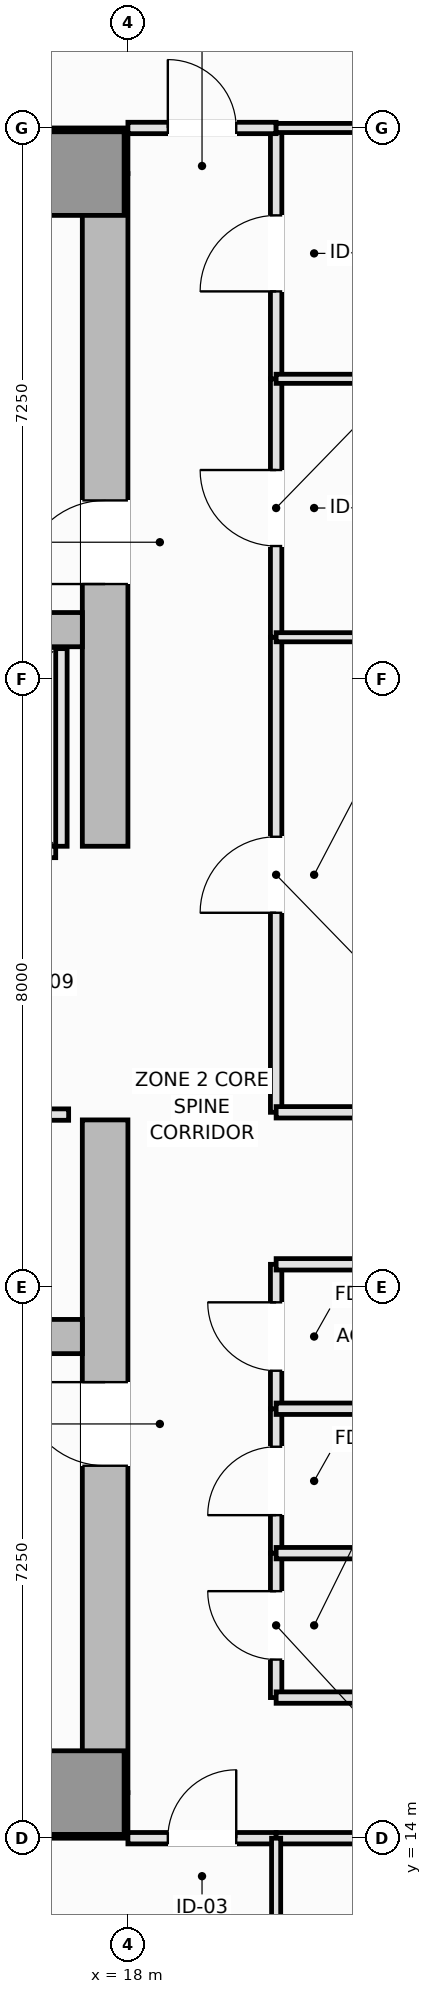
"""IFC4 building model, lengths in metres.
Left out: names, types, materials, properties, quantities, classifications, styles, units other than length and angle.
Written with IfcOpenShell. Run it as: python <this file> out.ifc"""

import sys

from ifc_helpers import new_model, si_unit, direction, frame, frame_2d, origin, origin_2d, place, context, subcontext, project, spatial, rectangle, extrude, element, fill, save


model = new_model("IFC4")
c1 = context("Model", 3, precision=1e-05, world=origin(), true_north=direction((0.0, 1.0)))
c2 = subcontext(c1, "Body", "Model", "MODEL_VIEW")
j1 = project(units=[si_unit("LENGTHUNIT", "METRE"), si_unit("PLANEANGLEUNIT", "RADIAN")], contexts=[c1])
p1 = place(None, origin())
s1 = spatial("IfcSite", under=j1, at=p1, CompositionType="ELEMENT")
p2 = place(p1, origin())
s2 = spatial("IfcBuilding", under=s1, at=p2, CompositionType="ELEMENT")
p3 = place(p2, frame((0.0, 0.0, 127.1)))
s3 = spatial("IfcBuildingStorey", under=s2, at=p3, CompositionType="ELEMENT", Elevation=127.1)
for number, where, z_axis, x_axis in (
    (1, (4.5, 14.3, 0.0), (0.0, 0.0, 1.0), (1.0, 0.0, 0.0)),
    (2, (4.5, 36.2, 0.0), (0.0, 0.0, 1.0), (1.0, 0.0, 0.0)),
):
    element("IfcWall", number, at=place(p3, frame(where, z_axis=z_axis, x_axis=x_axis)), inside=s3, PredefinedType="SHEAR", context=c2, shape_type="SweptSolid", body=[
        extrude(rectangle(XDim=13.5, YDim=0.6, at=frame_2d((6.75, 0.0))), origin(), (0.0, 0.0, 1.0), 3.55),
    ])
p4 = place(p3, frame((17.7, 14.6, 0.0), z_axis=(0.0, 0.0, 1.0), x_axis=(0.0, 1.0, 0.0)))
e3 = element("IfcWall", 3, at=p4, inside=s3, PredefinedType="SHEAR", context=c2, shape_type="SweptSolid", body=[
    extrude(rectangle(XDim=8.85, YDim=0.6, at=frame_2d((4.425, 0.0))), origin(), (0.0, 0.0, 1.0), 3.55),
])
p5 = place(p4, frame((4.3, 0.0, 0.0)))
e4 = element("IfcOpeningElement", 4, at=p5, cuts=e3, PredefinedType="OPENING", context=c2, shape_type="SweptSolid", body=[
    extrude(rectangle(XDim=1.1, YDim=2.15, at=frame_2d((0.55, 1.075))), frame((0.0, 0.31, 0.0), z_axis=(0.0, -1.0, 0.0), x_axis=(1.0, 0.0, 0.0)), (0.0, 0.0, 1.0), 0.62),
])
p6 = place(p3, frame((17.7, 27.05, 0.0), z_axis=(0.0, 0.0, 1.0), x_axis=(0.0, 1.0, 0.0)))
e5 = element("IfcWall", 5, at=p6, inside=s3, PredefinedType="SHEAR", context=c2, shape_type="SweptSolid", body=[
    extrude(rectangle(XDim=8.85, YDim=0.6, at=frame_2d((4.425, 0.0))), origin(), (0.0, 0.0, 1.0), 3.55),
])
p7 = place(p6, frame((3.45, 0.0, 0.0)))
e6 = element("IfcOpeningElement", 6, at=p7, cuts=e5, PredefinedType="OPENING", context=c2, shape_type="SweptSolid", body=[
    extrude(rectangle(XDim=1.1, YDim=2.15, at=frame_2d((0.55, 1.075))), frame((0.0, 0.31, 0.0), z_axis=(0.0, -1.0, 0.0), x_axis=(1.0, 0.0, 0.0)), (0.0, 0.0, 1.0), 0.62),
])
for number, where, z_axis, x_axis in (
    (7, (5.1, 20.6, 0.0), (0.0, 0.0, 1.0), (1.0, 0.0, 0.0)),
    (8, (5.1, 29.9, 0.0), (0.0, 0.0, 1.0), (1.0, 0.0, 0.0)),
):
    element("IfcWall", number, at=place(p3, frame(where, z_axis=z_axis, x_axis=x_axis)), inside=s3, PredefinedType="SHEAR", context=c2, shape_type="SweptSolid", body=[
        extrude(rectangle(XDim=12.3, YDim=0.45, at=frame_2d((6.15, 0.0))), origin(), (0.0, 0.0, 1.0), 3.55),
    ])
for number, where, z_axis, x_axis in (
    (9, (17.4, 14.6, 0.0), (0.0, 0.0, 1.0), (1.0, 0.0, 0.0)),
    (10, (17.4, 35.9, 0.0), (0.0, 0.0, 1.0), (1.0, 0.0, 0.0)),
):
    element("IfcColumn", number, at=place(p3, frame(where, z_axis=z_axis, x_axis=x_axis)), inside=s3, PredefinedType="PILASTER", context=c2, shape_type="SweptSolid", body=[
        extrude(rectangle(XDim=1.1, YDim=1.1, at=origin_2d()), origin(), (0.0, 0.0, 1.0), 3.55),
    ])
p8 = place(p3, frame((14.5, 26.975, 0.0), z_axis=(0.0, 0.0, 1.0), x_axis=(1.0, 0.0, 0.0)))
e11 = element("IfcWall", 11, at=p8, inside=s3, PredefinedType="PARTITIONING", context=c2, shape_type="SweptSolid", body=[
    extrude(rectangle(XDim=2.55, YDim=0.15, at=frame_2d((1.275, 0.0))), origin(), (0.0, 0.0, 1.0), 3.37),
])
p9 = place(p8, frame((0.625, 0.0, 0.0)))
e12 = element("IfcOpeningElement", 12, at=p9, cuts=e11, PredefinedType="OPENING", context=c2, shape_type="SweptSolid", body=[
    extrude(rectangle(XDim=1.3, YDim=2.2, at=frame_2d((0.65, 1.1))), frame((0.0, 0.085, 0.0), z_axis=(0.0, -1.0, 0.0), x_axis=(1.0, 0.0, 0.0)), (0.0, 0.0, 1.0), 0.17),
])
p10 = place(p3, frame((17.125, 27.05, 0.0), z_axis=(0.0, 0.0, 1.0), x_axis=(0.0, 1.0, 0.0)))
e13 = element("IfcWall", 13, at=p10, inside=s3, PredefinedType="PARTITIONING", context=c2, shape_type="SweptSolid", body=[
    extrude(rectangle(XDim=2.6, YDim=0.15, at=frame_2d((1.3, 0.0))), origin(), (0.0, 0.0, 1.0), 3.37),
])
p11 = place(p3, frame((14.33, 23.52, 0.0), z_axis=(0.0, 0.0, 1.0), x_axis=(1.0, 0.0, 0.0)))
e14 = element("IfcWall", 14, at=p11, inside=s3, PredefinedType="PARTITIONING", context=c2, shape_type="SweptSolid", body=[
    extrude(rectangle(XDim=2.89, YDim=0.15, at=frame_2d((1.445, 0.0))), origin(), (0.0, 0.0, 1.0), 3.37),
])
p12 = place(p11, frame((1.053, 0.0, 0.0)))
e15 = element("IfcOpeningElement", 15, at=p12, cuts=e14, PredefinedType="OPENING", context=c2, shape_type="SweptSolid", body=[
    extrude(rectangle(XDim=0.9, YDim=2.1, at=frame_2d((0.45, 1.05))), frame((0.0, 0.085, 0.0), z_axis=(0.0, -1.0, 0.0), x_axis=(1.0, 0.0, 0.0)), (0.0, 0.0, 1.0), 0.17),
])
p13 = place(p3, frame((19.95, 15.85, 0.0), z_axis=(0.0, 0.0, 1.0), x_axis=(0.0, 1.0, 0.0)))
e16 = element("IfcWall", 16, at=p13, inside=s3, PredefinedType="PLUMBINGWALL", context=c2, shape_type="SweptSolid", body=[
    extrude(rectangle(XDim=1.9, YDim=0.15, at=frame_2d((0.95, 0.0))), origin(), (0.0, 0.0, 1.0), 3.37),
])
p14 = place(p13, frame((0.5, 0.0, 0.0)))
e17 = element("IfcOpeningElement", 17, at=p14, cuts=e16, PredefinedType="OPENING", context=c2, shape_type="SweptSolid", body=[
    extrude(rectangle(XDim=0.9, YDim=2.1, at=frame_2d((0.45, 1.05))), frame((0.0, 0.085, 0.0), z_axis=(0.0, -1.0, 0.0), x_axis=(1.0, 0.0, 0.0)), (0.0, 0.0, 1.0), 0.17),
])
p15 = place(p3, frame((19.95, 17.75, 0.0), z_axis=(0.0, 0.0, 1.0), x_axis=(0.0, 1.0, 0.0)))
e18 = element("IfcWall", 18, at=p15, inside=s3, PredefinedType="PLUMBINGWALL", context=c2, shape_type="SweptSolid", body=[
    extrude(rectangle(XDim=1.9, YDim=0.15, at=frame_2d((0.95, 0.0))), origin(), (0.0, 0.0, 1.0), 3.37),
])
p16 = place(p15, frame((0.5, 0.0, 0.0)))
e19 = element("IfcOpeningElement", 19, at=p16, cuts=e18, PredefinedType="OPENING", context=c2, shape_type="SweptSolid", body=[
    extrude(rectangle(XDim=0.9, YDim=2.1, at=frame_2d((0.45, 1.05))), frame((0.0, 0.085, 0.0), z_axis=(0.0, -1.0, 0.0), x_axis=(1.0, 0.0, 0.0)), (0.0, 0.0, 1.0), 0.17),
])
p17 = place(p3, frame((19.95, 19.65, 0.0), z_axis=(0.0, 0.0, 1.0), x_axis=(0.0, 1.0, 0.0)))
e20 = element("IfcWall", 20, at=p17, inside=s3, PredefinedType="PLUMBINGWALL", context=c2, shape_type="SweptSolid", body=[
    extrude(rectangle(XDim=1.9, YDim=0.15, at=frame_2d((0.95, 0.0))), origin(), (0.0, 0.0, 1.0), 3.37),
])
p18 = place(p17, frame((0.5, 0.0, 0.0)))
e21 = element("IfcOpeningElement", 21, at=p18, cuts=e20, PredefinedType="OPENING", context=c2, shape_type="SweptSolid", body=[
    extrude(rectangle(XDim=0.9, YDim=2.1, at=frame_2d((0.45, 1.05))), frame((0.0, 0.085, 0.0), z_axis=(0.0, -1.0, 0.0), x_axis=(1.0, 0.0, 0.0)), (0.0, 0.0, 1.0), 0.17),
])
p19 = place(p3, frame((19.95, 23.55, 0.0), z_axis=(0.0, 0.0, 1.0), x_axis=(0.0, 1.0, 0.0)))
e22 = element("IfcWall", 22, at=p19, inside=s3, PredefinedType="PARTITIONING", context=c2, shape_type="SweptSolid", body=[
    extrude(rectangle(XDim=6.25, YDim=0.15, at=frame_2d((3.125, 0.0))), origin(), (0.0, 0.0, 1.0), 3.37),
])
p20 = place(p19, frame((2.625, 0.0, 0.0)))
e23 = element("IfcOpeningElement", 23, at=p20, cuts=e22, PredefinedType="OPENING", context=c2, shape_type="SweptSolid", body=[
    extrude(rectangle(XDim=1.0, YDim=2.15, at=frame_2d((0.5, 1.075))), frame((0.0, 0.085, 0.0), z_axis=(0.0, -1.0, 0.0), x_axis=(1.0, 0.0, 0.0)), (0.0, 0.0, 1.0), 0.17),
])
p21 = place(p3, frame((19.95, 29.8, 0.0), z_axis=(0.0, 0.0, 1.0), x_axis=(0.0, 1.0, 0.0)))
e24 = element("IfcWall", 24, at=p21, inside=s3, PredefinedType="PARTITIONING", context=c2, shape_type="SweptSolid", body=[
    extrude(rectangle(XDim=3.4, YDim=0.15, at=frame_2d((1.7, 0.0))), origin(), (0.0, 0.0, 1.0), 3.37),
])
p22 = place(p21, frame((1.2, 0.0, 0.0)))
e25 = element("IfcOpeningElement", 25, at=p22, cuts=e24, PredefinedType="OPENING", context=c2, shape_type="SweptSolid", body=[
    extrude(rectangle(XDim=1.0, YDim=2.15, at=frame_2d((0.5, 1.075))), frame((0.0, 0.085, 0.0), z_axis=(0.0, -1.0, 0.0), x_axis=(1.0, 0.0, 0.0)), (0.0, 0.0, 1.0), 0.17),
])
p23 = place(p3, frame((19.95, 33.2, 0.0), z_axis=(0.0, 0.0, 1.0), x_axis=(0.0, 1.0, 0.0)))
e26 = element("IfcWall", 26, at=p23, inside=s3, PredefinedType="PARTITIONING", context=c2, shape_type="SweptSolid", body=[
    extrude(rectangle(XDim=3.3, YDim=0.15, at=frame_2d((1.65, 0.0))), origin(), (0.0, 0.0, 1.0), 3.37),
])
p24 = place(p23, frame((1.15, 0.0, 0.0)))
e27 = element("IfcOpeningElement", 27, at=p24, cuts=e26, PredefinedType="OPENING", context=c2, shape_type="SweptSolid", body=[
    extrude(rectangle(XDim=1.0, YDim=2.15, at=frame_2d((0.5, 1.075))), frame((0.0, 0.085, 0.0), z_axis=(0.0, -1.0, 0.0), x_axis=(1.0, 0.0, 0.0)), (0.0, 0.0, 1.0), 0.17),
])
p25 = place(p3, frame((18.0, 14.0, 0.0), z_axis=(0.0, 0.0, 1.0), x_axis=(1.0, 0.0, 0.0)))
e28 = element("IfcWall", 28, at=p25, inside=s3, PredefinedType="PARTITIONING", context=c2, shape_type="SweptSolid", body=[
    extrude(rectangle(XDim=1.95, YDim=0.15, at=frame_2d((0.975, 0.0))), origin(), (0.0, 0.0, 1.0), 3.37),
])
p26 = place(p25, frame((0.525, 0.0, 0.0)))
e29 = element("IfcOpeningElement", 29, at=p26, cuts=e28, PredefinedType="OPENING", context=c2, shape_type="SweptSolid", body=[
    extrude(rectangle(XDim=0.9, YDim=2.1, at=frame_2d((0.45, 1.05))), frame((0.0, 0.085, 0.0), z_axis=(0.0, -1.0, 0.0), x_axis=(1.0, 0.0, 0.0)), (0.0, 0.0, 1.0), 0.17),
])
p27 = place(p3, frame((18.0, 36.5, 0.0), z_axis=(0.0, 0.0, 1.0), x_axis=(1.0, 0.0, 0.0)))
e30 = element("IfcWall", 30, at=p27, inside=s3, PredefinedType="PARTITIONING", context=c2, shape_type="SweptSolid", body=[
    extrude(rectangle(XDim=1.95, YDim=0.15, at=frame_2d((0.975, 0.0))), origin(), (0.0, 0.0, 1.0), 3.37),
])
p28 = place(p27, frame((0.525, 0.0, 0.0)))
e31 = element("IfcOpeningElement", 31, at=p28, cuts=e30, PredefinedType="OPENING", context=c2, shape_type="SweptSolid", body=[
    extrude(rectangle(XDim=0.9, YDim=2.1, at=frame_2d((0.45, 1.05))), frame((0.0, 0.085, 0.0), z_axis=(0.0, -1.0, 0.0), x_axis=(1.0, 0.0, 0.0)), (0.0, 0.0, 1.0), 0.17),
])
p29 = place(p3, frame((19.95, 21.55, 0.0), z_axis=(0.0, 0.0, 1.0), x_axis=(1.0, 0.0, 0.0)))
e32 = element("IfcWall", 32, at=p29, inside=s3, PredefinedType="PLUMBINGWALL", context=c2, shape_type="SweptSolid", body=[
    extrude(rectangle(XDim=3.65, YDim=0.15, at=frame_2d((1.825, 0.0))), origin(), (0.0, 0.0, 1.0), 3.37),
])
p30 = place(p3, frame((19.95, 23.55, 0.0), z_axis=(0.0, 0.0, 1.0), x_axis=(1.0, 0.0, 0.0)))
e33 = element("IfcWall", 33, at=p30, inside=s3, PredefinedType="PARTITIONING", context=c2, shape_type="SweptSolid", body=[
    extrude(rectangle(XDim=7.55, YDim=0.15, at=frame_2d((3.775, 0.0))), origin(), (0.0, 0.0, 1.0), 3.37),
])
p31 = place(p3, frame((19.95, 15.85, 0.0), z_axis=(0.0, 0.0, 1.0), x_axis=(1.0, 0.0, 0.0)))
e34 = element("IfcWall", 34, at=p31, inside=s3, PredefinedType="PLUMBINGWALL", context=c2, shape_type="SweptSolid", body=[
    extrude(rectangle(XDim=3.65, YDim=0.15, at=frame_2d((1.825, 0.0))), origin(), (0.0, 0.0, 1.0), 3.37),
])
p32 = place(p3, frame((19.95, 14.0, 0.0), z_axis=(0.0, 0.0, 1.0), x_axis=(1.0, 0.0, 0.0)))
e35 = element("IfcWall", 35, at=p32, inside=s3, PredefinedType="PARTITIONING", context=c2, shape_type="SweptSolid", body=[
    extrude(rectangle(XDim=7.55, YDim=0.15, at=frame_2d((3.775, 0.0))), origin(), (0.0, 0.0, 1.0), 3.37),
])
p33 = place(p32, frame((3.275, 0.0, 0.0)))
e36 = element("IfcOpeningElement", 36, at=p33, cuts=e35, PredefinedType="OPENING", context=c2, shape_type="SweptSolid", body=[
    extrude(rectangle(XDim=1.0, YDim=2.15, at=frame_2d((0.5, 1.075))), frame((0.0, 0.085, 0.0), z_axis=(0.0, -1.0, 0.0), x_axis=(1.0, 0.0, 0.0)), (0.0, 0.0, 1.0), 0.17),
])
for number, where, z_axis, x_axis in (
    (37, (19.95, 17.75, 0.0), (0.0, 0.0, 1.0), (1.0, 0.0, 0.0)),
    (38, (19.95, 19.65, 0.0), (0.0, 0.0, 1.0), (1.0, 0.0, 0.0)),
):
    element("IfcWall", number, at=place(p3, frame(where, z_axis=z_axis, x_axis=x_axis)), inside=s3, PredefinedType="PLUMBINGWALL", context=c2, shape_type="SweptSolid", body=[
        extrude(rectangle(XDim=3.65, YDim=0.15, at=frame_2d((1.825, 0.0))), origin(), (0.0, 0.0, 1.0), 3.37),
    ])
for number, where, z_axis, x_axis in (
    (39, (19.95, 29.8, 0.0), (0.0, 0.0, 1.0), (1.0, 0.0, 0.0)),
    (40, (19.95, 33.2, 0.0), (0.0, 0.0, 1.0), (1.0, 0.0, 0.0)),
    (41, (19.95, 36.5, 0.0), (0.0, 0.0, 1.0), (1.0, 0.0, 0.0)),
):
    element("IfcWall", number, at=place(p3, frame(where, z_axis=z_axis, x_axis=x_axis)), inside=s3, PredefinedType="PARTITIONING", context=c2, shape_type="SweptSolid", body=[
        extrude(rectangle(XDim=7.55, YDim=0.12, at=frame_2d((3.775, 0.0))), origin(), (0.0, 0.0, 1.0), 3.37),
    ])
p34 = place(p3, frame((19.95, 3.51, 0.0), z_axis=(0.0, 0.0, 1.0), x_axis=(0.0, 1.0, 0.0)))
e42 = element("IfcWall", 42, at=p34, inside=s3, PredefinedType="PARTITIONING", context=c2, shape_type="SweptSolid", body=[
    extrude(rectangle(XDim=10.49, YDim=0.12, at=frame_2d((5.245, 0.0))), origin(), (0.0, 0.0, 1.0), 3.37),
])
p35 = place(p5, origin())
e43 = element("IfcDoor", 43, at=p35, inside=s3, OperationType="SINGLE_SWING_RIGHT", PredefinedType="DOOR", context=c2, shape_type="SweptSolid", body=[
    extrude(rectangle(XDim=1.1, YDim=2.15, at=frame_2d((0.55, 1.075))), frame((0.0, 0.025, 0.0), z_axis=(0.0, -1.0, 0.0), x_axis=(1.0, 0.0, 0.0)), (0.0, 0.0, 1.0), 0.05),
])
fill(e4, e43)
p36 = place(p7, origin())
e44 = element("IfcDoor", 44, at=p36, inside=s3, OperationType="SINGLE_SWING_LEFT", PredefinedType="DOOR", context=c2, shape_type="SweptSolid", body=[
    extrude(rectangle(XDim=1.1, YDim=2.15, at=frame_2d((0.55, 1.075))), frame((0.0, 0.025, 0.0), z_axis=(0.0, -1.0, 0.0), x_axis=(1.0, 0.0, 0.0)), (0.0, 0.0, 1.0), 0.05),
])
fill(e6, e44)
p37 = place(p14, origin())
e45 = element("IfcDoor", 45, at=p37, inside=s3, OperationType="SINGLE_SWING_RIGHT", PredefinedType="DOOR", context=c2, shape_type="SweptSolid", body=[
    extrude(rectangle(XDim=0.9, YDim=2.1, at=frame_2d((0.45, 1.05))), frame((0.0, 0.025, 0.0), z_axis=(0.0, -1.0, 0.0), x_axis=(1.0, 0.0, 0.0)), (0.0, 0.0, 1.0), 0.05),
])
fill(e17, e45)
p38 = place(p16, origin())
e46 = element("IfcDoor", 46, at=p38, inside=s3, OperationType="SINGLE_SWING_LEFT", PredefinedType="DOOR", context=c2, shape_type="SweptSolid", body=[
    extrude(rectangle(XDim=0.9, YDim=2.1, at=frame_2d((0.45, 1.05))), frame((0.0, 0.025, 0.0), z_axis=(0.0, -1.0, 0.0), x_axis=(1.0, 0.0, 0.0)), (0.0, 0.0, 1.0), 0.05),
])
fill(e19, e46)
p39 = place(p18, origin())
e47 = element("IfcDoor", 47, at=p39, inside=s3, OperationType="SINGLE_SWING_RIGHT", PredefinedType="DOOR", context=c2, shape_type="SweptSolid", body=[
    extrude(rectangle(XDim=0.9, YDim=2.1, at=frame_2d((0.45, 1.05))), frame((0.0, 0.025, 0.0), z_axis=(0.0, -1.0, 0.0), x_axis=(1.0, 0.0, 0.0)), (0.0, 0.0, 1.0), 0.05),
])
fill(e21, e47)
p40 = place(p20, origin())
e48 = element("IfcDoor", 48, at=p40, inside=s3, OperationType="SINGLE_SWING_LEFT", PredefinedType="DOOR", context=c2, shape_type="SweptSolid", body=[
    extrude(rectangle(XDim=1.0, YDim=2.15, at=frame_2d((0.5, 1.075))), frame((0.0, 0.025, 0.0), z_axis=(0.0, -1.0, 0.0), x_axis=(1.0, 0.0, 0.0)), (0.0, 0.0, 1.0), 0.05),
])
fill(e23, e48)
p41 = place(p22, origin())
e49 = element("IfcDoor", 49, at=p41, inside=s3, OperationType="SINGLE_SWING_RIGHT", PredefinedType="DOOR", context=c2, shape_type="SweptSolid", body=[
    extrude(rectangle(XDim=1.0, YDim=2.15, at=frame_2d((0.5, 1.075))), frame((0.0, 0.025, 0.0), z_axis=(0.0, -1.0, 0.0), x_axis=(1.0, 0.0, 0.0)), (0.0, 0.0, 1.0), 0.05),
])
fill(e25, e49)
p42 = place(p24, origin())
e50 = element("IfcDoor", 50, at=p42, inside=s3, OperationType="SINGLE_SWING_LEFT", PredefinedType="DOOR", context=c2, shape_type="SweptSolid", body=[
    extrude(rectangle(XDim=1.0, YDim=2.15, at=frame_2d((0.5, 1.075))), frame((0.0, 0.025, 0.0), z_axis=(0.0, -1.0, 0.0), x_axis=(1.0, 0.0, 0.0)), (0.0, 0.0, 1.0), 0.05),
])
fill(e27, e50)
p43 = place(p26, origin())
e51 = element("IfcDoor", 51, at=p43, inside=s3, OperationType="SINGLE_SWING_RIGHT", PredefinedType="DOOR", context=c2, shape_type="SweptSolid", body=[
    extrude(rectangle(XDim=0.9, YDim=2.1, at=frame_2d((0.45, 1.05))), frame((0.0, 0.025, 0.0), z_axis=(0.0, -1.0, 0.0), x_axis=(1.0, 0.0, 0.0)), (0.0, 0.0, 1.0), 0.05),
])
fill(e29, e51)
p44 = place(p28, origin())
e52 = element("IfcDoor", 52, at=p44, inside=s3, OperationType="SINGLE_SWING_LEFT", PredefinedType="DOOR", context=c2, shape_type="SweptSolid", body=[
    extrude(rectangle(XDim=0.9, YDim=2.1, at=frame_2d((0.45, 1.05))), frame((0.0, 0.025, 0.0), z_axis=(0.0, -1.0, 0.0), x_axis=(1.0, 0.0, 0.0)), (0.0, 0.0, 1.0), 0.05),
])
fill(e31, e52)
save(model, sys.argv[1])
